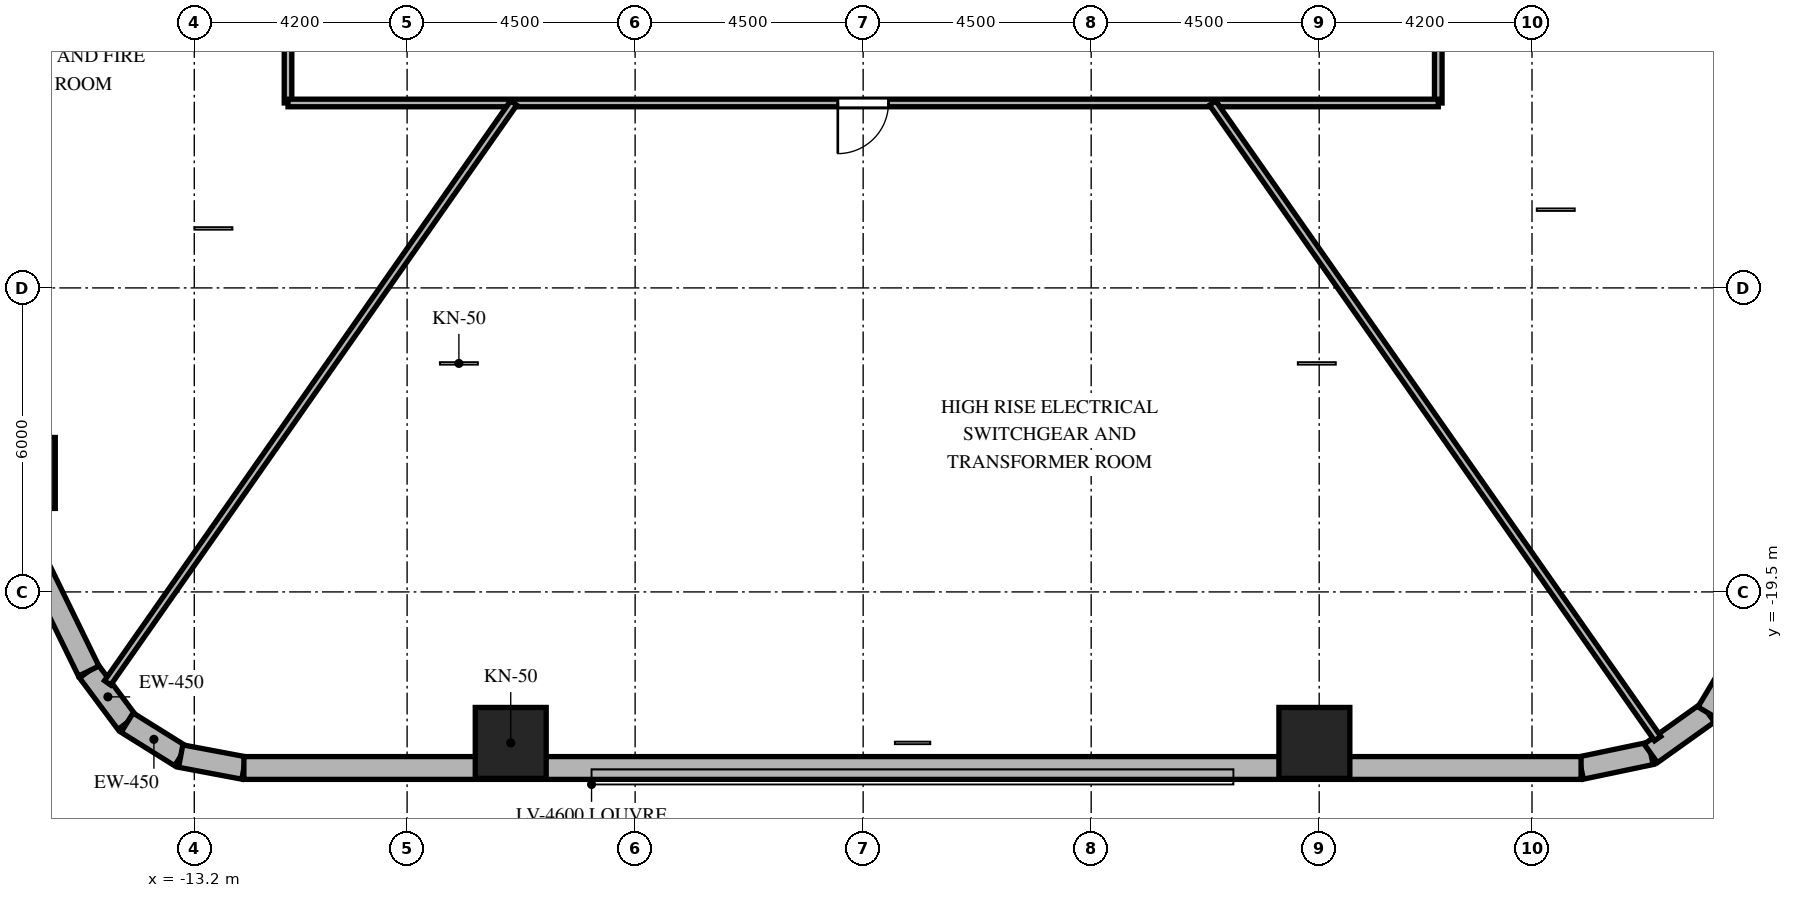
"""IFC4 building model, lengths in metres.
Left out: names, types, materials, properties, quantities, classifications, styles, units other than length and angle.
Written with IfcOpenShell. Run it as: python <this file> out.ifc"""

import sys

from ifc_helpers import new_model, si_unit, direction, frame, frame_2d, origin, origin_2d, place, context, subcontext, project, spatial, rectangle, extrude, element, fill, save


model = new_model("IFC4")
c1 = context("Model", 3, precision=1e-05, world=origin(), true_north=direction((0.0, 1.0)))
c2 = subcontext(c1, "Body", "Model", "MODEL_VIEW")
j1 = project(units=[si_unit("LENGTHUNIT", "METRE"), si_unit("PLANEANGLEUNIT", "RADIAN")], contexts=[c1])
p1 = place(None, origin())
s1 = spatial("IfcSite", under=j1, at=p1, CompositionType="ELEMENT")
p2 = place(p1, origin())
s2 = spatial("IfcBuilding", under=s1, at=p2, CompositionType="ELEMENT")
p3 = place(p2, frame((0.0, 0.0, 86.0)))
s3 = spatial("IfcBuildingStorey", under=s2, at=p3, CompositionType="ELEMENT", Elevation=86.0)
for number, where, z_axis, x_axis in (
    (1, (-6.955, -22.48, 0.0), (0.0, 0.0, 1.0), (1.0, 0.0, 0.0)),
    (2, (8.905, -22.48, 0.0), (0.0, 0.0, 1.0), (1.0, 0.0, 0.0)),
    (3, (-16.643, -17.152, 0.0), (0.0, 0.0, 1.0), (1.0, 0.0, 0.0)),
):
    element("IfcColumn", number, at=place(p3, frame(where, z_axis=z_axis, x_axis=x_axis)), inside=s3, PredefinedType="COLUMN", context=c2, shape_type="SweptSolid", body=[
        extrude(rectangle(XDim=1.4, YDim=1.4, at=origin_2d()), origin(), (0.0, 0.0, 1.0), 5.4),
    ])
p4 = place(p3, frame((-15.284, -21.062, 0.0), z_axis=(0.0, 0.0, 1.0), x_axis=(0.597595366449, -0.801797841104, 0.0)))
e4 = element("IfcWall", 4, at=p4, inside=s3, PredefinedType="SOLIDWALL", context=c2, shape_type="SweptSolid", body=[
    extrude(rectangle(XDim=1.269, YDim=0.45, at=frame_2d((0.634, 0.0))), origin(), (0.0, 0.0, 1.0), 5.1),
])
p5 = place(p3, frame((-14.526, -22.08, 0.0), z_axis=(0.0, 0.0, 1.0), x_axis=(0.848185203596, -0.529699783275, 0.0)))
e5 = element("IfcWall", 5, at=p5, inside=s3, PredefinedType="SOLIDWALL", context=c2, shape_type="SweptSolid", body=[
    extrude(rectangle(XDim=1.247, YDim=0.45, at=frame_2d((0.624, 0.0))), origin(), (0.0, 0.0, 1.0), 5.1),
])
p6 = place(p3, frame((-13.468, -22.74, 0.0), z_axis=(0.0, 0.0, 1.0), x_axis=(0.982717174228, -0.185113358451, 0.0)))
e6 = element("IfcWall", 6, at=p6, inside=s3, PredefinedType="SOLIDWALL", context=c2, shape_type="SweptSolid", body=[
    extrude(rectangle(XDim=1.269, YDim=0.45, at=frame_2d((0.634, 0.0))), origin(), (0.0, 0.0, 1.0), 5.1),
])
p7 = place(p3, frame((14.168, -22.975, 0.0), z_axis=(0.0, 0.0, 1.0), x_axis=(0.978770371074, 0.204959900243, 0.0)))
e7 = element("IfcWall", 7, at=p7, inside=s3, PredefinedType="SOLIDWALL", context=c2, shape_type="SweptSolid", body=[
    extrude(rectangle(XDim=1.406, YDim=0.45, at=frame_2d((0.703, 0.0))), origin(), (0.0, 0.0, 1.0), 5.1),
])
p8 = place(p3, frame((15.544, -22.687, 0.0), z_axis=(0.0, 0.0, 1.0), x_axis=(0.814210854316, 0.580569276412, 0.0)))
e8 = element("IfcWall", 8, at=p8, inside=s3, PredefinedType="SOLIDWALL", context=c2, shape_type="SweptSolid", body=[
    extrude(rectangle(XDim=1.381, YDim=0.45, at=frame_2d((0.691, 0.0))), origin(), (0.0, 0.0, 1.0), 5.1),
])
p9 = place(p3, frame((16.669, -21.885, 0.0), z_axis=(0.0, 0.0, 1.0), x_axis=(0.512936712947, 0.858426425799, 0.0)))
e9 = element("IfcWall", 9, at=p9, inside=s3, PredefinedType="SOLIDWALL", context=c2, shape_type="SweptSolid", body=[
    extrude(rectangle(XDim=1.406, YDim=0.45, at=frame_2d((0.703, 0.0))), origin(), (0.0, 0.0, 1.0), 5.1),
])
p10 = place(p3, frame((-12.221, -22.975, 0.0), z_axis=(0.0, 0.0, 1.0), x_axis=(1.0, 0.0, 0.0)))
e10 = element("IfcWall", 10, at=p10, inside=s3, PredefinedType="SOLIDWALL", context=c2, shape_type="SweptSolid", body=[
    extrude(rectangle(XDim=26.389, YDim=0.45, at=frame_2d((13.195, 0.0))), origin(), (0.0, 0.0, 1.0), 5.1),
])
p11 = place(p3, frame((-24.336, -2.532, 0.0), z_axis=(0.0, 0.0, 1.0), x_axis=(0.438931326393, -0.898520612291, 0.0)))
e11 = element("IfcWall", 11, at=p11, inside=s3, PredefinedType="SOLIDWALL", context=c2, shape_type="SweptSolid", body=[
    extrude(rectangle(XDim=20.623, YDim=0.45, at=frame_2d((10.312, 0.0))), origin(), (0.0, 0.0, 1.0), 5.1),
])
p12 = place(p3, frame((-11.35, -9.85, 0.0), z_axis=(0.0, 0.0, 1.0), x_axis=(0.0, 1.0, 0.0)))
e12 = element("IfcWall", 12, at=p12, inside=s3, PredefinedType="PARTITIONING", context=c2, shape_type="SweptSolid", body=[
    extrude(rectangle(XDim=19.7, YDim=0.15, at=frame_2d((9.85, 0.0))), origin(), (0.0, 0.0, 1.0), 3.29),
])
p13 = place(p12, frame((10.825, 0.0, 0.0)))
e13 = element("IfcOpeningElement", 13, at=p13, cuts=e12, PredefinedType="OPENING", context=c2, shape_type="SweptSolid", body=[
    extrude(rectangle(XDim=1.05, YDim=2.15, at=frame_2d((0.525, 1.075))), frame((0.0, 0.085, 0.0), z_axis=(0.0, -1.0, 0.0), x_axis=(1.0, 0.0, 0.0)), (0.0, 0.0, 1.0), 0.17),
])
p14 = place(p12, frame((16.255, 0.0, 0.0)))
e14 = element("IfcOpeningElement", 14, at=p14, cuts=e12, PredefinedType="OPENING", context=c2, shape_type="SweptSolid", body=[
    extrude(rectangle(XDim=1.0, YDim=2.15, at=frame_2d((0.5, 1.075))), frame((0.0, 0.085, 0.0), z_axis=(0.0, -1.0, 0.0), x_axis=(1.0, 0.0, 0.0)), (0.0, 0.0, 1.0), 0.17),
])
p15 = place(p12, frame((3.945, 0.0, 0.0)))
e15 = element("IfcOpeningElement", 15, at=p15, cuts=e12, PredefinedType="OPENING", context=c2, shape_type="SweptSolid", body=[
    extrude(rectangle(XDim=1.0, YDim=2.15, at=frame_2d((0.5, 1.075))), frame((0.0, 0.085, 0.0), z_axis=(0.0, -1.0, 0.0), x_axis=(1.0, 0.0, 0.0)), (0.0, 0.0, 1.0), 0.17),
])
p16 = place(p3, frame((11.35, 9.85, 0.0), z_axis=(0.0, 0.0, 1.0), x_axis=(0.0, -1.0, 0.0)))
e16 = element("IfcWall", 16, at=p16, inside=s3, PredefinedType="PARTITIONING", context=c2, shape_type="SweptSolid", body=[
    extrude(rectangle(XDim=19.7, YDim=0.15, at=frame_2d((9.85, 0.0))), origin(), (0.0, 0.0, 1.0), 3.29),
])
p17 = place(p16, frame((7.825, 0.0, 0.0)))
e17 = element("IfcOpeningElement", 17, at=p17, cuts=e16, PredefinedType="OPENING", context=c2, shape_type="SweptSolid", body=[
    extrude(rectangle(XDim=1.05, YDim=2.15, at=frame_2d((0.525, 1.075))), frame((0.0, 0.085, 0.0), z_axis=(0.0, -1.0, 0.0), x_axis=(1.0, 0.0, 0.0)), (0.0, 0.0, 1.0), 0.17),
])
p18 = place(p16, frame((13.207, 0.0, 0.0)))
e18 = element("IfcOpeningElement", 18, at=p18, cuts=e16, PredefinedType="OPENING", context=c2, shape_type="SweptSolid", body=[
    extrude(rectangle(XDim=1.0, YDim=2.15, at=frame_2d((0.5, 1.075))), frame((0.0, 0.085, 0.0), z_axis=(0.0, -1.0, 0.0), x_axis=(1.0, 0.0, 0.0)), (0.0, 0.0, 1.0), 0.17),
])
p19 = place(p3, frame((11.35, -9.85, 0.0), z_axis=(0.0, 0.0, 1.0), x_axis=(-1.0, 0.0, 0.0)))
e19 = element("IfcWall", 19, at=p19, inside=s3, PredefinedType="PARTITIONING", context=c2, shape_type="SweptSolid", body=[
    extrude(rectangle(XDim=22.7, YDim=0.15, at=frame_2d((11.35, 0.0))), origin(), (0.0, 0.0, 1.0), 3.29),
])
p20 = place(p19, frame((10.85, 0.0, 0.0)))
e20 = element("IfcOpeningElement", 20, at=p20, cuts=e19, PredefinedType="OPENING", context=c2, shape_type="SweptSolid", body=[
    extrude(rectangle(XDim=1.0, YDim=2.15, at=frame_2d((0.5, 1.075))), frame((0.0, 0.085, 0.0), z_axis=(0.0, -1.0, 0.0), x_axis=(1.0, 0.0, 0.0)), (0.0, 0.0, 1.0), 0.17),
])
p21 = place(p3, frame((-6.897, -9.85, 0.0), z_axis=(0.0, 0.0, 1.0), x_axis=(-0.573584304237, -0.81914653508, 0.0)))
e21 = element("IfcWall", 21, at=p21, inside=s3, PredefinedType="PARTITIONING", context=c2, shape_type="SweptSolid", body=[
    extrude(rectangle(XDim=13.972, YDim=0.15, at=frame_2d((6.986, 0.0))), origin(), (0.0, 0.0, 1.0), 3.29),
])
p22 = place(p3, frame((6.897, -9.85, 0.0), z_axis=(0.0, 0.0, 1.0), x_axis=(0.573581114898, -0.819148768315, 0.0)))
e22 = element("IfcWall", 22, at=p22, inside=s3, PredefinedType="PARTITIONING", context=c2, shape_type="SweptSolid", body=[
    extrude(rectangle(XDim=15.312, YDim=0.15, at=frame_2d((7.656, 0.0))), origin(), (0.0, 0.0, 1.0), 3.29),
])
p23 = place(p20, origin())
e23 = element("IfcDoor", 23, at=p23, inside=s3, OperationType="SINGLE_SWING_RIGHT", PredefinedType="DOOR", context=c2, shape_type="SweptSolid", body=[
    extrude(rectangle(XDim=1.0, YDim=2.15, at=frame_2d((0.5, 1.075))), frame((0.0, 0.025, 0.0), z_axis=(0.0, -1.0, 0.0), x_axis=(1.0, 0.0, 0.0)), (0.0, 0.0, 1.0), 0.05),
])
fill(e20, e23)
save(model, sys.argv[1])
